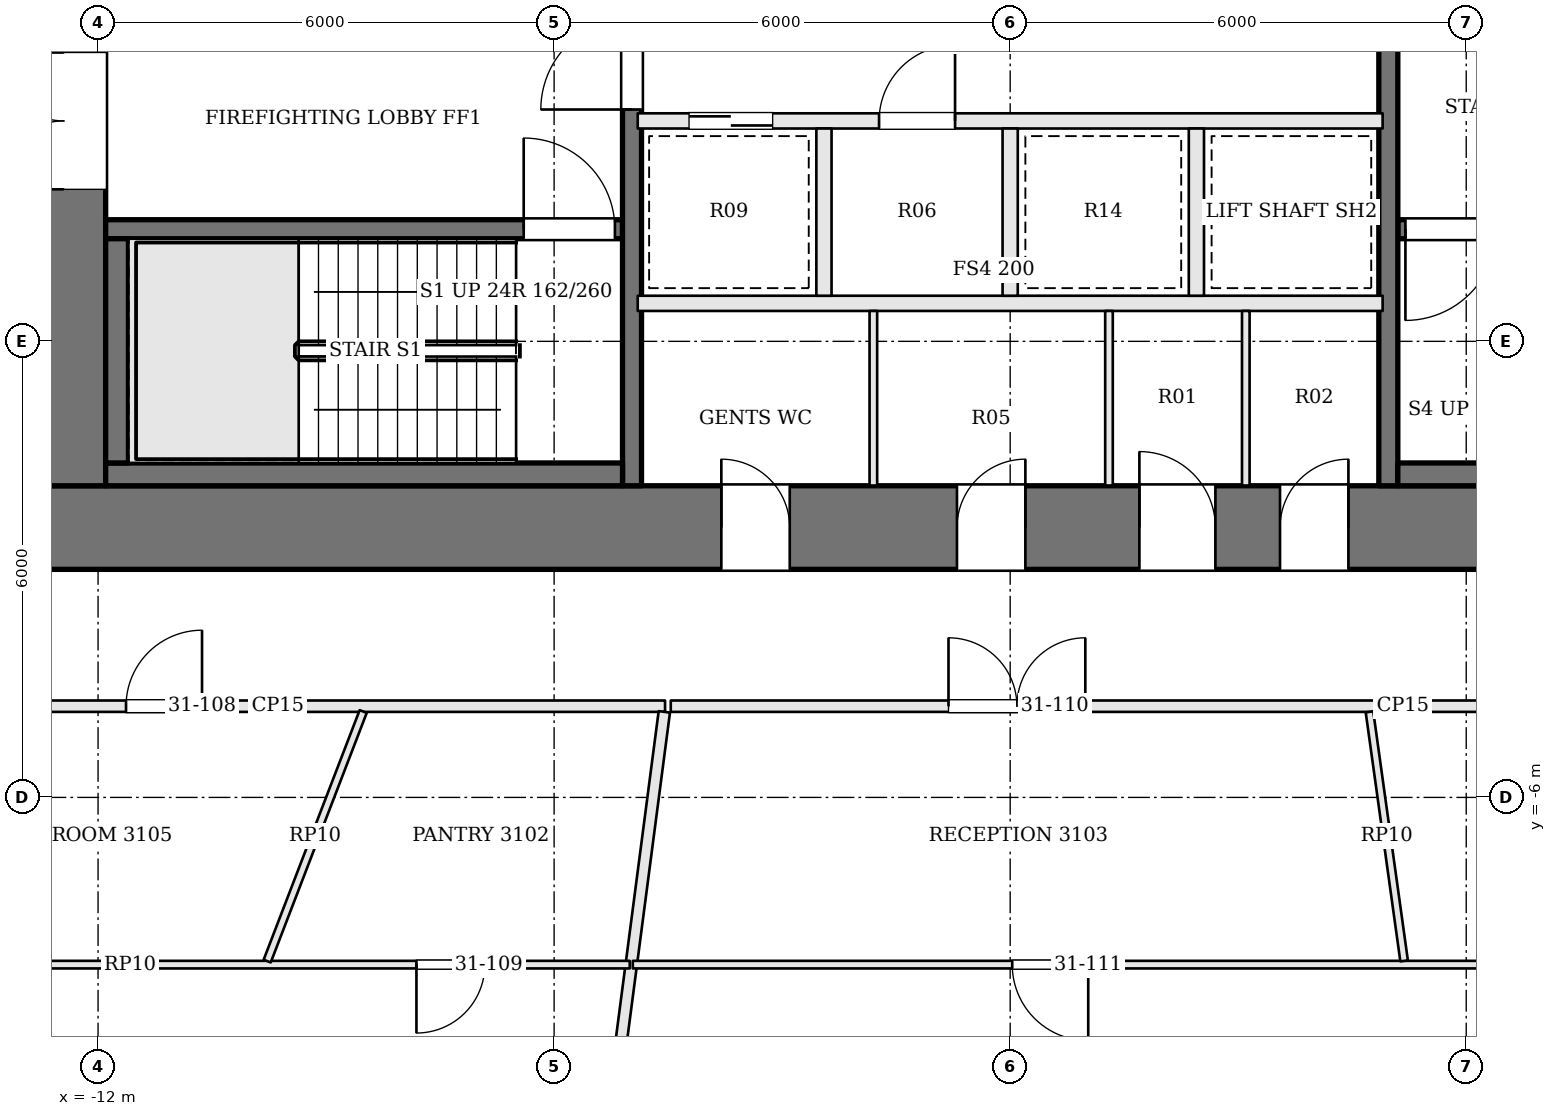
"""IFC4 building model, lengths in metres.
Left out: names, types, materials, properties, quantities, classifications, styles, units other than length and angle.
Written with IfcOpenShell. Run it as: python <this file> out.ifc"""

import sys

from ifc_helpers import new_model, si_unit, direction, frame, frame_2d, origin, place, context, subcontext, project, spatial, rectangle, extrude, element, fill, save


model = new_model("IFC4")
c1 = context("Model", 3, precision=1e-05, world=origin(), true_north=direction((0.0, 1.0)))
c2 = subcontext(c1, "Body", "Model", "MODEL_VIEW")
j1 = project(units=[si_unit("LENGTHUNIT", "METRE"), si_unit("PLANEANGLEUNIT", "RADIAN")], contexts=[c1])
p1 = place(None, origin())
s1 = spatial("IfcSite", under=j1, at=p1, CompositionType="ELEMENT")
p2 = place(p1, origin())
s2 = spatial("IfcBuilding", under=s1, at=p2, CompositionType="ELEMENT")
p3 = place(p2, frame((0.0, 0.0, 130.5)))
s3 = spatial("IfcBuildingStorey", under=s2, at=p3, CompositionType="ELEMENT", Elevation=130.5)
p4 = place(p3, frame((-13.0, -2.45, 0.0), z_axis=(0.0, 0.0, 1.0), x_axis=(1.0, 0.0, 0.0)))
e1 = element("IfcWall", 1, at=p4, inside=s3, PredefinedType="SHEAR", context=c2, shape_type="SweptSolid", body=[
    extrude(rectangle(XDim=26.0, YDim=1.1, at=frame_2d((13.0, 0.0))), origin(), (0.0, 0.0, 1.0), 3.9),
])
p5 = place(p4, frame((9.2, 0.0, 0.0)))
e2 = element("IfcOpeningElement", 2, at=p5, cuts=e1, PredefinedType="OPENING", context=c2, shape_type="SweptSolid", body=[
    extrude(rectangle(XDim=0.9, YDim=2.1, at=frame_2d((0.45, 1.05))), frame((0.0, 0.56, 0.0), z_axis=(0.0, -1.0, 0.0), x_axis=(1.0, 0.0, 0.0)), (0.0, 0.0, 1.0), 1.12),
])
p6 = place(p4, frame((12.3, 0.0, 0.0)))
e3 = element("IfcOpeningElement", 3, at=p6, cuts=e1, PredefinedType="OPENING", context=c2, shape_type="SweptSolid", body=[
    extrude(rectangle(XDim=0.9, YDim=2.1, at=frame_2d((0.45, 1.05))), frame((0.0, 0.56, 0.0), z_axis=(0.0, -1.0, 0.0), x_axis=(1.0, 0.0, 0.0)), (0.0, 0.0, 1.0), 1.12),
])
p7 = place(p4, frame((14.7, 0.0, 0.0)))
e4 = element("IfcOpeningElement", 4, at=p7, cuts=e1, PredefinedType="OPENING", context=c2, shape_type="SweptSolid", body=[
    extrude(rectangle(XDim=1.0, YDim=2.1, at=frame_2d((0.5, 1.05))), frame((0.0, 0.56, 0.0), z_axis=(0.0, -1.0, 0.0), x_axis=(1.0, 0.0, 0.0)), (0.0, 0.0, 1.0), 1.12),
])
p8 = place(p4, frame((16.55, 0.0, 0.0)))
e5 = element("IfcOpeningElement", 5, at=p8, cuts=e1, PredefinedType="OPENING", context=c2, shape_type="SweptSolid", body=[
    extrude(rectangle(XDim=0.9, YDim=2.1, at=frame_2d((0.45, 1.05))), frame((0.0, 0.56, 0.0), z_axis=(0.0, -1.0, 0.0), x_axis=(1.0, 0.0, 0.0)), (0.0, 0.0, 1.0), 1.12),
])
p9 = place(p3, frame((-12.45, -1.9, 0.0), z_axis=(0.0, 0.0, 1.0), x_axis=(0.0, 1.0, 0.0)))
e6 = element("IfcWall", 6, at=p9, inside=s3, PredefinedType="SHEAR", context=c2, shape_type="SweptSolid", body=[
    extrude(rectangle(XDim=12.8, YDim=1.1, at=frame_2d((6.4, 0.0))), origin(), (0.0, 0.0, 1.0), 3.9),
])
p10 = place(p9, frame((3.9, 0.0, 0.0)))
e7 = element("IfcOpeningElement", 7, at=p10, cuts=e6, PredefinedType="OPENING", context=c2, shape_type="SweptSolid", body=[
    extrude(rectangle(XDim=1.8, YDim=2.1, at=frame_2d((0.9, 1.05))), frame((0.0, 0.56, 0.0), z_axis=(0.0, -1.0, 0.0), x_axis=(1.0, 0.0, 0.0)), (0.0, 0.0, 1.0), 1.12),
])
p11 = place(p3, frame((-11.9, 1.475, 0.0), z_axis=(0.0, 0.0, 1.0), x_axis=(1.0, 0.0, 0.0)))
e8 = element("IfcWall", 8, at=p11, inside=s3, PredefinedType="SOLIDWALL", context=c2, shape_type="SweptSolid", body=[
    extrude(rectangle(XDim=6.8, YDim=0.25, at=frame_2d((3.4, 0.0))), origin(), (0.0, 0.0, 1.0), 3.7),
])
p12 = place(p11, frame((5.5, 0.0, 0.0)))
e9 = element("IfcOpeningElement", 9, at=p12, cuts=e8, PredefinedType="OPENING", context=c2, shape_type="SweptSolid", body=[
    extrude(rectangle(XDim=1.2, YDim=2.1, at=frame_2d((0.6, 1.05))), frame((0.0, 0.135, 0.0), z_axis=(0.0, -1.0, 0.0), x_axis=(1.0, 0.0, 0.0)), (0.0, 0.0, 1.0), 0.27),
])
p13 = place(p3, frame((11.9, 1.475, 0.0), z_axis=(0.0, 0.0, 1.0), x_axis=(-1.0, 0.0, 0.0)))
e10 = element("IfcWall", 10, at=p13, inside=s3, PredefinedType="SOLIDWALL", context=c2, shape_type="SweptSolid", body=[
    extrude(rectangle(XDim=6.8, YDim=0.25, at=frame_2d((3.4, 0.0))), origin(), (0.0, 0.0, 1.0), 3.7),
])
p14 = place(p13, frame((5.5, 0.0, 0.0)))
e11 = element("IfcOpeningElement", 11, at=p14, cuts=e10, PredefinedType="OPENING", context=c2, shape_type="SweptSolid", body=[
    extrude(rectangle(XDim=1.2, YDim=2.1, at=frame_2d((0.6, 1.05))), frame((0.0, 0.135, 0.0), z_axis=(0.0, -1.0, 0.0), x_axis=(1.0, 0.0, 0.0)), (0.0, 0.0, 1.0), 0.27),
])
p15 = place(p3, frame((-4.975, -1.9, 0.0), z_axis=(0.0, 0.0, 1.0), x_axis=(0.0, 1.0, 0.0)))
e12 = element("IfcWall", 12, at=p15, inside=s3, PredefinedType="SOLIDWALL", context=c2, shape_type="SweptSolid", body=[
    extrude(rectangle(XDim=12.8, YDim=0.25, at=frame_2d((6.4, 0.0))), origin(), (0.0, 0.0, 1.0), 3.7),
])
p16 = place(p15, frame((4.95, 0.0, 0.0)))
e13 = element("IfcOpeningElement", 13, at=p16, cuts=e12, PredefinedType="OPENING", context=c2, shape_type="SweptSolid", body=[
    extrude(rectangle(XDim=1.2, YDim=2.1, at=frame_2d((0.6, 1.05))), frame((0.0, 0.135, 0.0), z_axis=(0.0, -1.0, 0.0), x_axis=(1.0, 0.0, 0.0)), (0.0, 0.0, 1.0), 0.27),
])
p17 = place(p3, frame((4.975, 10.9, 0.0), z_axis=(0.0, 0.0, 1.0), x_axis=(0.0, -1.0, 0.0)))
e14 = element("IfcWall", 14, at=p17, inside=s3, PredefinedType="SOLIDWALL", context=c2, shape_type="SweptSolid", body=[
    extrude(rectangle(XDim=12.8, YDim=0.25, at=frame_2d((6.4, 0.0))), origin(), (0.0, 0.0, 1.0), 3.7),
])
p18 = place(p17, frame((4.95, 0.0, 0.0)))
e15 = element("IfcOpeningElement", 15, at=p18, cuts=e14, PredefinedType="OPENING", context=c2, shape_type="SweptSolid", body=[
    extrude(rectangle(XDim=1.2, YDim=2.1, at=frame_2d((0.6, 1.05))), frame((0.0, 0.135, 0.0), z_axis=(0.0, -1.0, 0.0), x_axis=(1.0, 0.0, 0.0)), (0.0, 0.0, 1.0), 0.27),
])
p19 = place(p3, frame((-11.9, -1.75, 0.0), z_axis=(0.0, 0.0, 1.0), x_axis=(1.0, 0.0, 0.0)))
e16 = element("IfcWall", 16, at=p19, inside=s3, PredefinedType="SOLIDWALL", context=c2, shape_type="SweptSolid", body=[
    extrude(rectangle(XDim=6.8, YDim=0.3, at=frame_2d((3.4, 0.0))), origin(), (0.0, 0.0, 1.0), 3.7),
])
p20 = place(p3, frame((-11.75, -1.6, 0.0), z_axis=(0.0, 0.0, 1.0), x_axis=(0.0, 1.0, 0.0)))
e17 = element("IfcWall", 17, at=p20, inside=s3, PredefinedType="SOLIDWALL", context=c2, shape_type="SweptSolid", body=[
    extrude(rectangle(XDim=2.95, YDim=0.3, at=frame_2d((1.475, 0.0))), origin(), (0.0, 0.0, 1.0), 3.7),
])
p21 = place(p3, frame((11.9, -1.75, 0.0), z_axis=(0.0, 0.0, 1.0), x_axis=(-1.0, 0.0, 0.0)))
e18 = element("IfcWall", 18, at=p21, inside=s3, PredefinedType="SOLIDWALL", context=c2, shape_type="SweptSolid", body=[
    extrude(rectangle(XDim=6.8, YDim=0.3, at=frame_2d((3.4, 0.0))), origin(), (0.0, 0.0, 1.0), 3.7),
])
p22 = place(p3, frame((-4.9, 0.5, 0.0), z_axis=(0.0, 0.0, 1.0), x_axis=(1.0, 0.0, 0.0)))
e19 = element("IfcWall", 19, at=p22, inside=s3, PredefinedType="SOLIDWALL", context=c2, shape_type="SweptSolid", body=[
    extrude(rectangle(XDim=9.8, YDim=0.2, at=frame_2d((4.9, 0.0))), origin(), (0.0, 0.0, 1.0), 3.7),
])
p23 = place(p3, frame((-4.9, 2.9, 0.0), z_axis=(0.0, 0.0, 1.0), x_axis=(1.0, 0.0, 0.0)))
e20 = element("IfcWall", 20, at=p23, inside=s3, PredefinedType="SOLIDWALL", context=c2, shape_type="SweptSolid", body=[
    extrude(rectangle(XDim=9.8, YDim=0.2, at=frame_2d((4.9, 0.0))), origin(), (0.0, 0.0, 1.0), 3.7),
])
p24 = place(p23, frame((0.675, 0.0, 0.0)))
e21 = element("IfcOpeningElement", 21, at=p24, cuts=e20, PredefinedType="OPENING", context=c2, shape_type="SweptSolid", body=[
    extrude(rectangle(XDim=1.1, YDim=2.1, at=frame_2d((0.55, 1.05))), frame((0.0, 0.11, 0.0), z_axis=(0.0, -1.0, 0.0), x_axis=(1.0, 0.0, 0.0)), (0.0, 0.0, 1.0), 0.22),
])
p25 = place(p23, frame((3.175, 0.0, 0.0)))
e22 = element("IfcOpeningElement", 22, at=p25, cuts=e20, PredefinedType="OPENING", context=c2, shape_type="SweptSolid", body=[
    extrude(rectangle(XDim=1.0, YDim=2.1, at=frame_2d((0.5, 1.05))), frame((0.0, 0.11, 0.0), z_axis=(0.0, -1.0, 0.0), x_axis=(1.0, 0.0, 0.0)), (0.0, 0.0, 1.0), 0.22),
])
for number, where, z_axis, x_axis in (
    (23, (-2.45, 0.6, 0.0), (0.0, 0.0, 1.0), (0.0, 1.0, 0.0)),
    (24, (0.0, 0.6, 0.0), (0.0, 0.0, 1.0), (0.0, 1.0, 0.0)),
    (25, (2.45, 0.6, 0.0), (0.0, 0.0, 1.0), (0.0, 1.0, 0.0)),
):
    element("IfcWall", number, at=place(p3, frame(where, z_axis=z_axis, x_axis=x_axis)), inside=s3, PredefinedType="SOLIDWALL", context=c2, shape_type="SweptSolid", body=[
        extrude(rectangle(XDim=2.2, YDim=0.2, at=frame_2d((1.1, 0.0))), origin(), (0.0, 0.0, 1.0), 3.7),
    ])
for number, where, z_axis, x_axis in (
    (26, (-1.8, -1.9, 0.0), (0.0, 0.0, 1.0), (0.0, 1.0, 0.0)),
    (27, (1.3, -1.9, 0.0), (0.0, 0.0, 1.0), (0.0, 1.0, 0.0)),
    (28, (3.1, -1.9, 0.0), (0.0, 0.0, 1.0), (0.0, 1.0, 0.0)),
):
    element("IfcWall", number, at=place(p3, frame(where, z_axis=z_axis, x_axis=x_axis)), inside=s3, PredefinedType="PARTITIONING", context=c2, shape_type="SweptSolid", body=[
        extrude(rectangle(XDim=2.3, YDim=0.1, at=frame_2d((1.15, 0.0))), origin(), (0.0, 0.0, 1.0), 3.7),
    ])
p26 = place(p3, frame((-14.725, -4.8, 0.0), z_axis=(0.0, 0.0, 1.0), x_axis=(1.0, 0.0, 0.0)))
e29 = element("IfcWall", 29, at=p26, inside=s3, PredefinedType="PARTITIONING", context=c2, shape_type="SweptSolid", body=[
    extrude(rectangle(XDim=10.185, YDim=0.15, at=frame_2d((5.092, 0.0))), origin(), (0.0, 0.0, 1.0), 3.198),
])
p27 = place(p26, frame((3.093, 0.0, 0.0)))
e30 = element("IfcOpeningElement", 30, at=p27, cuts=e29, PredefinedType="OPENING", context=c2, shape_type="SweptSolid", body=[
    extrude(rectangle(XDim=1.0, YDim=2.4, at=frame_2d((0.5, 1.2))), frame((0.0, 0.085, 0.0), z_axis=(0.0, -1.0, 0.0), x_axis=(1.0, 0.0, 0.0)), (0.0, 0.0, 1.0), 0.17),
])
p28 = place(p3, frame((-6.337, -18.542, 0.0), z_axis=(0.0, 0.0, 1.0), x_axis=(0.129674631383, 0.991556599482, 0.0)))
e31 = element("IfcWall", 31, at=p28, inside=s3, PredefinedType="PARTITIONING", context=c2, shape_type="SweptSolid", body=[
    extrude(rectangle(XDim=13.783, YDim=0.15, at=frame_2d((6.892, 0.0))), origin(), (0.0, 0.0, 1.0), 3.198),
])
p29 = place(p3, frame((-4.465, -4.8, 0.0), z_axis=(0.0, 0.0, 1.0), x_axis=(1.0, 0.0, 0.0)))
e32 = element("IfcWall", 32, at=p29, inside=s3, PredefinedType="PARTITIONING", context=c2, shape_type="SweptSolid", body=[
    extrude(rectangle(XDim=19.265, YDim=0.15, at=frame_2d((9.633, 0.0))), origin(), (0.0, 0.0, 1.0), 3.198),
])
p30 = place(p29, frame((3.654, 0.0, 0.0)))
e33 = element("IfcOpeningElement", 33, at=p30, cuts=e32, PredefinedType="OPENING", context=c2, shape_type="SweptSolid", body=[
    extrude(rectangle(XDim=1.8, YDim=2.1, at=frame_2d((0.9, 1.05))), frame((0.0, 0.085, 0.0), z_axis=(0.0, -1.0, 0.0), x_axis=(1.0, 0.0, 0.0)), (0.0, 0.0, 1.0), 0.17),
])
p31 = place(p29, frame((11.229, 0.0, 0.0)))
e34 = element("IfcOpeningElement", 34, at=p31, cuts=e32, PredefinedType="OPENING", context=c2, shape_type="SweptSolid", body=[
    extrude(rectangle(XDim=1.0, YDim=2.4, at=frame_2d((0.5, 1.2))), frame((0.0, 0.085, 0.0), z_axis=(0.0, -1.0, 0.0), x_axis=(1.0, 0.0, 0.0)), (0.0, 0.0, 1.0), 0.17),
])
p32 = place(p3, frame((-5.005, -8.2, 0.0), z_axis=(0.0, 0.0, 1.0), x_axis=(-1.0, 0.0, 0.0)))
e35 = element("IfcWall", 35, at=p32, inside=s3, PredefinedType="PARTITIONING", context=c2, shape_type="SweptSolid", body=[
    extrude(rectangle(XDim=13.145, YDim=0.1, at=frame_2d((6.572, 0.0))), origin(), (0.0, 0.0, 1.0), 3.184),
])
p33 = place(p32, frame((1.906, 0.0, 0.0)))
e36 = element("IfcOpeningElement", 36, at=p33, cuts=e35, PredefinedType="OPENING", context=c2, shape_type="SweptSolid", body=[
    extrude(rectangle(XDim=0.9, YDim=2.1, at=frame_2d((0.45, 1.05))), frame((0.0, 0.06, 0.0), z_axis=(0.0, -1.0, 0.0), x_axis=(1.0, 0.0, 0.0)), (0.0, 0.0, 1.0), 0.12),
])
p34 = place(p3, frame((-8.512, -4.87, 0.0), z_axis=(0.0, 0.0, 1.0), x_axis=(-0.359020935305, -0.933329506666, 0.0)))
e37 = element("IfcWall", 37, at=p34, inside=s3, PredefinedType="PARTITIONING", context=c2, shape_type="SweptSolid", body=[
    extrude(rectangle(XDim=3.518, YDim=0.1, at=frame_2d((1.759, 0.0))), origin(), (0.0, 0.0, 1.0), 3.184),
])
p35 = place(p3, frame((18.15, -8.2, 0.0), z_axis=(0.0, 0.0, 1.0), x_axis=(-1.0, 0.0, 0.0)))
e38 = element("IfcWall", 38, at=p35, inside=s3, PredefinedType="PARTITIONING", context=c2, shape_type="SweptSolid", body=[
    extrude(rectangle(XDim=23.115, YDim=0.1, at=frame_2d((11.557, 0.0))), origin(), (0.0, 0.0, 1.0), 3.184),
])
p36 = place(p35, frame((17.123, 0.0, 0.0)))
e39 = element("IfcOpeningElement", 39, at=p36, cuts=e38, PredefinedType="OPENING", context=c2, shape_type="SweptSolid", body=[
    extrude(rectangle(XDim=1.0, YDim=2.1, at=frame_2d((0.5, 1.05))), frame((0.0, 0.06, 0.0), z_axis=(0.0, -1.0, 0.0), x_axis=(1.0, 0.0, 0.0)), (0.0, 0.0, 1.0), 0.12),
])
p37 = place(p3, frame((4.727, -4.874, 0.0), z_axis=(0.0, 0.0, 1.0), x_axis=(0.13773130116, -0.990469630368, 0.0)))
e40 = element("IfcWall", 40, at=p37, inside=s3, PredefinedType="PARTITIONING", context=c2, shape_type="SweptSolid", body=[
    extrude(rectangle(XDim=3.308, YDim=0.1, at=frame_2d((1.654, 0.0))), origin(), (0.0, 0.0, 1.0), 3.184),
])
p38 = place(p10, origin())
e41 = element("IfcDoor", 41, at=p38, inside=s3, OperationType="DOUBLE_DOOR_SINGLE_SWING", PredefinedType="DOOR", context=c2, shape_type="SweptSolid", body=[
    extrude(rectangle(XDim=1.8, YDim=2.1, at=frame_2d((0.9, 1.05))), frame((0.0, 0.025, 0.0), z_axis=(0.0, -1.0, 0.0), x_axis=(1.0, 0.0, 0.0)), (0.0, 0.0, 1.0), 0.05),
])
fill(e7, e41)
p39 = place(p16, origin())
e42 = element("IfcDoor", 42, at=p39, inside=s3, OperationType="SINGLE_SWING_LEFT", PredefinedType="DOOR", context=c2, shape_type="SweptSolid", body=[
    extrude(rectangle(XDim=1.2, YDim=2.1, at=frame_2d((0.6, 1.05))), frame((0.0, 0.025, 0.0), z_axis=(0.0, -1.0, 0.0), x_axis=(1.0, 0.0, 0.0)), (0.0, 0.0, 1.0), 0.05),
])
fill(e13, e42)
p40 = place(p12, origin())
e43 = element("IfcDoor", 43, at=p40, inside=s3, OperationType="SINGLE_SWING_LEFT", PredefinedType="DOOR", context=c2, shape_type="SweptSolid", body=[
    extrude(rectangle(XDim=1.2, YDim=2.1, at=frame_2d((0.6, 1.05))), frame((0.0, 0.025, 0.0), z_axis=(0.0, -1.0, 0.0), x_axis=(1.0, 0.0, 0.0)), (0.0, 0.0, 1.0), 0.05),
])
fill(e9, e43)
p41 = place(p14, origin())
e44 = element("IfcDoor", 44, at=p41, inside=s3, OperationType="SINGLE_SWING_RIGHT", PredefinedType="DOOR", context=c2, shape_type="SweptSolid", body=[
    extrude(rectangle(XDim=1.2, YDim=2.1, at=frame_2d((0.6, 1.05))), frame((0.0, 0.025, 0.0), z_axis=(0.0, -1.0, 0.0), x_axis=(1.0, 0.0, 0.0)), (0.0, 0.0, 1.0), 0.05),
])
fill(e11, e44)
p42 = place(p24, origin())
e45 = element("IfcDoor", 45, at=p42, inside=s3, OperationType="SLIDING_TO_RIGHT", PredefinedType="DOOR", context=c2, shape_type="SweptSolid", body=[
    extrude(rectangle(XDim=1.1, YDim=2.1, at=frame_2d((0.55, 1.05))), frame((0.0, 0.025, 0.0), z_axis=(0.0, -1.0, 0.0), x_axis=(1.0, 0.0, 0.0)), (0.0, 0.0, 1.0), 0.05),
])
fill(e21, e45)
p43 = place(p25, origin())
e46 = element("IfcDoor", 46, at=p43, inside=s3, OperationType="SINGLE_SWING_RIGHT", PredefinedType="DOOR", context=c2, shape_type="SweptSolid", body=[
    extrude(rectangle(XDim=1.0, YDim=2.1, at=frame_2d((0.5, 1.05))), frame((0.0, 0.025, 0.0), z_axis=(0.0, -1.0, 0.0), x_axis=(1.0, 0.0, 0.0)), (0.0, 0.0, 1.0), 0.05),
])
fill(e22, e46)
p44 = place(p5, origin())
e47 = element("IfcDoor", 47, at=p44, inside=s3, OperationType="SINGLE_SWING_LEFT", PredefinedType="DOOR", context=c2, shape_type="SweptSolid", body=[
    extrude(rectangle(XDim=0.9, YDim=2.1, at=frame_2d((0.45, 1.05))), frame((0.0, 0.025, 0.0), z_axis=(0.0, -1.0, 0.0), x_axis=(1.0, 0.0, 0.0)), (0.0, 0.0, 1.0), 0.05),
])
fill(e2, e47)
p45 = place(p6, origin())
e48 = element("IfcDoor", 48, at=p45, inside=s3, OperationType="SINGLE_SWING_RIGHT", PredefinedType="DOOR", context=c2, shape_type="SweptSolid", body=[
    extrude(rectangle(XDim=0.9, YDim=2.1, at=frame_2d((0.45, 1.05))), frame((0.0, 0.025, 0.0), z_axis=(0.0, -1.0, 0.0), x_axis=(1.0, 0.0, 0.0)), (0.0, 0.0, 1.0), 0.05),
])
fill(e3, e48)
p46 = place(p7, origin())
e49 = element("IfcDoor", 49, at=p46, inside=s3, OperationType="SINGLE_SWING_LEFT", PredefinedType="DOOR", context=c2, shape_type="SweptSolid", body=[
    extrude(rectangle(XDim=1.0, YDim=2.1, at=frame_2d((0.5, 1.05))), frame((0.0, 0.025, 0.0), z_axis=(0.0, -1.0, 0.0), x_axis=(1.0, 0.0, 0.0)), (0.0, 0.0, 1.0), 0.05),
])
fill(e4, e49)
p47 = place(p8, origin())
e50 = element("IfcDoor", 50, at=p47, inside=s3, OperationType="SINGLE_SWING_RIGHT", PredefinedType="DOOR", context=c2, shape_type="SweptSolid", body=[
    extrude(rectangle(XDim=0.9, YDim=2.1, at=frame_2d((0.45, 1.05))), frame((0.0, 0.025, 0.0), z_axis=(0.0, -1.0, 0.0), x_axis=(1.0, 0.0, 0.0)), (0.0, 0.0, 1.0), 0.05),
])
fill(e5, e50)
p48 = place(p27, origin())
e51 = element("IfcDoor", 51, at=p48, inside=s3, OperationType="SINGLE_SWING_RIGHT", PredefinedType="DOOR", context=c2, shape_type="SweptSolid", body=[
    extrude(rectangle(XDim=1.0, YDim=2.4, at=frame_2d((0.5, 1.2))), frame((0.0, 0.025, 0.0), z_axis=(0.0, -1.0, 0.0), x_axis=(1.0, 0.0, 0.0)), (0.0, 0.0, 1.0), 0.05),
])
fill(e30, e51)
p49 = place(p33, origin())
e52 = element("IfcDoor", 52, at=p49, inside=s3, OperationType="SINGLE_SWING_RIGHT", PredefinedType="DOOR", context=c2, shape_type="SweptSolid", body=[
    extrude(rectangle(XDim=0.9, YDim=2.1, at=frame_2d((0.45, 1.05))), frame((0.0, 0.025, 0.0), z_axis=(0.0, -1.0, 0.0), x_axis=(1.0, 0.0, 0.0)), (0.0, 0.0, 1.0), 0.05),
])
fill(e36, e52)
p50 = place(p30, origin())
e53 = element("IfcDoor", 53, at=p50, inside=s3, OperationType="DOUBLE_DOOR_SINGLE_SWING", PredefinedType="DOOR", context=c2, shape_type="SweptSolid", body=[
    extrude(rectangle(XDim=1.8, YDim=2.1, at=frame_2d((0.9, 1.05))), frame((0.0, 0.025, 0.0), z_axis=(0.0, -1.0, 0.0), x_axis=(1.0, 0.0, 0.0)), (0.0, 0.0, 1.0), 0.05),
])
fill(e33, e53)
p51 = place(p36, origin())
e54 = element("IfcDoor", 54, at=p51, inside=s3, OperationType="SINGLE_SWING_LEFT", PredefinedType="DOOR", context=c2, shape_type="SweptSolid", body=[
    extrude(rectangle(XDim=1.0, YDim=2.1, at=frame_2d((0.5, 1.05))), frame((0.0, 0.025, 0.0), z_axis=(0.0, -1.0, 0.0), x_axis=(1.0, 0.0, 0.0)), (0.0, 0.0, 1.0), 0.05),
])
fill(e39, e54)
save(model, sys.argv[1])
